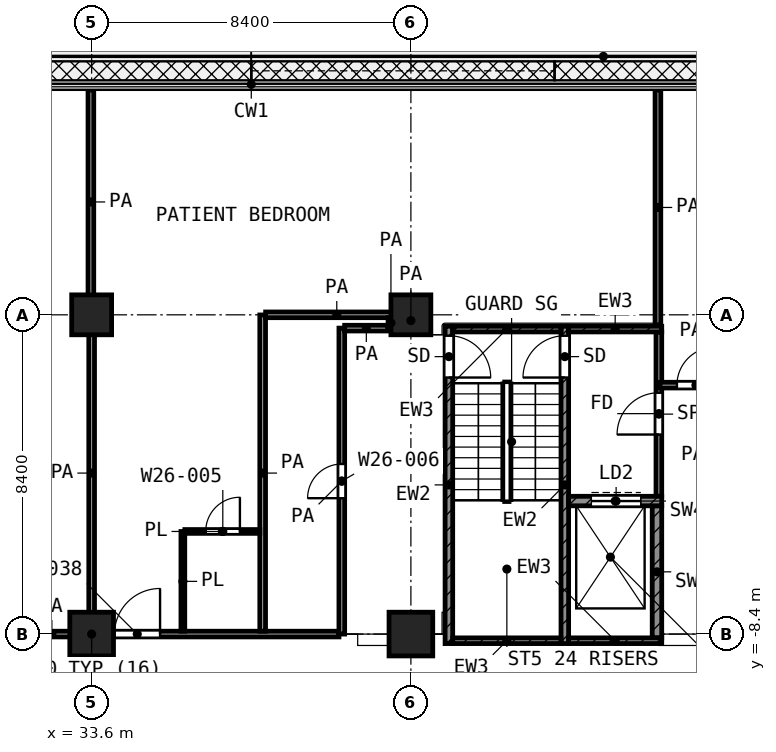
"""IFC4 building model, lengths in metres.
Left out: names, types, materials, properties, quantities, classifications, styles, units other than length and angle.
Written with IfcOpenShell. Run it as: python <this file> out.ifc"""

import sys

from ifc_helpers import new_model, si_unit, direction, frame, frame_2d, origin, origin_2d, place, context, subcontext, project, spatial, rectangle, extrude, element, fill, save


model = new_model("IFC4")
c1 = context("Model", 3, precision=1e-05, world=origin(), true_north=direction((0.0, 1.0)))
c2 = subcontext(c1, "Body", "Model", "MODEL_VIEW")
j1 = project(units=[si_unit("LENGTHUNIT", "METRE"), si_unit("PLANEANGLEUNIT", "RADIAN")], contexts=[c1])
p1 = place(None, origin())
s1 = spatial("IfcSite", under=j1, at=p1, CompositionType="ELEMENT")
p2 = place(p1, origin())
s2 = spatial("IfcBuilding", under=s1, at=p2, CompositionType="ELEMENT")
p3 = place(p2, frame((0.0, 0.0, 136.6)))
s3 = spatial("IfcBuildingStorey", under=s2, at=p3, CompositionType="ELEMENT", Elevation=136.6)
for number, where, z_axis, x_axis in (
    (1, (33.6, 0.0, 0.0), (0.0, 0.0, 1.0), (1.0, 0.0, 0.0)),
    (2, (42.0, 0.0, 0.0), (0.0, 0.0, 1.0), (1.0, 0.0, 0.0)),
):
    element("IfcColumn", number, at=place(p3, frame(where, z_axis=z_axis, x_axis=x_axis)), inside=s3, PredefinedType="COLUMN", context=c2, shape_type="SweptSolid", body=[
        extrude(rectangle(XDim=1.05, YDim=1.05, at=origin_2d()), origin(), (0.0, 0.0, 1.0), 4.2),
    ])
for number, where, z_axis, x_axis in (
    (3, (33.6, -8.4, 0.0), (0.0, 0.0, 1.0), (1.0, 0.0, 0.0)),
    (4, (42.0, -8.4, 0.0), (0.0, 0.0, 1.0), (1.0, 0.0, 0.0)),
):
    element("IfcColumn", number, at=place(p3, frame(where, z_axis=z_axis, x_axis=x_axis)), inside=s3, PredefinedType="COLUMN", context=c2, shape_type="SweptSolid", body=[
        extrude(rectangle(XDim=1.15, YDim=1.15, at=origin_2d()), origin(), (0.0, 0.0, 1.0), 4.2),
    ])
p4 = place(p3, frame((43.0, -8.65, 0.0), z_axis=(0.0, 0.0, 1.0), x_axis=(0.0, 1.0, 0.0)))
e5 = element("IfcWall", 5, at=p4, inside=s3, PredefinedType="SHEAR", context=c2, shape_type="SweptSolid", body=[
    extrude(rectangle(XDim=8.35, YDim=0.2, at=frame_2d((4.175, 0.0))), origin(), (0.0, 0.0, 1.0), 3.6),
])
p5 = place(p4, frame((7.0, 0.0, 0.0)))
e6 = element("IfcOpeningElement", 6, at=p5, cuts=e5, PredefinedType="OPENING", context=c2, shape_type="SweptSolid", body=[
    extrude(rectangle(XDim=1.1, YDim=2.1, at=frame_2d((0.55, 1.05))), frame((0.0, 0.11, 0.0), z_axis=(0.0, -1.0, 0.0), x_axis=(1.0, 0.0, 0.0)), (0.0, 0.0, 1.0), 0.22),
])
p6 = place(p3, frame((46.05, -8.65, 0.0), z_axis=(0.0, 0.0, 1.0), x_axis=(0.0, 1.0, 0.0)))
e7 = element("IfcWall", 7, at=p6, inside=s3, PredefinedType="SHEAR", context=c2, shape_type="SweptSolid", body=[
    extrude(rectangle(XDim=8.35, YDim=0.2, at=frame_2d((4.175, 0.0))), origin(), (0.0, 0.0, 1.0), 3.6),
])
p7 = place(p6, frame((7.0, 0.0, 0.0)))
e8 = element("IfcOpeningElement", 8, at=p7, cuts=e7, PredefinedType="OPENING", context=c2, shape_type="SweptSolid", body=[
    extrude(rectangle(XDim=1.1, YDim=2.1, at=frame_2d((0.55, 1.05))), frame((0.0, 0.11, 0.0), z_axis=(0.0, -1.0, 0.0), x_axis=(1.0, 0.0, 0.0)), (0.0, 0.0, 1.0), 0.22),
])
p8 = place(p3, frame((43.1, -0.375, 0.0), z_axis=(0.0, 0.0, 1.0), x_axis=(1.0, 0.0, 0.0)))
e9 = element("IfcWall", 9, at=p8, inside=s3, PredefinedType="SHEAR", context=c2, shape_type="SweptSolid", body=[
    extrude(rectangle(XDim=2.85, YDim=0.15, at=frame_2d((1.425, 0.0))), origin(), (0.0, 0.0, 1.0), 3.6),
])
p9 = place(p3, frame((46.15, -0.375, 0.0), z_axis=(0.0, 0.0, 1.0), x_axis=(1.0, 0.0, 0.0)))
e10 = element("IfcWall", 10, at=p9, inside=s3, PredefinedType="SHEAR", context=c2, shape_type="SweptSolid", body=[
    extrude(rectangle(XDim=2.45, YDim=0.15, at=frame_2d((1.225, 0.0))), origin(), (0.0, 0.0, 1.0), 3.6),
])
p10 = place(p3, frame((43.1, -8.575, 0.0), z_axis=(0.0, 0.0, 1.0), x_axis=(1.0, 0.0, 0.0)))
e11 = element("IfcWall", 11, at=p10, inside=s3, PredefinedType="SHEAR", context=c2, shape_type="SweptSolid", body=[
    extrude(rectangle(XDim=2.85, YDim=0.15, at=frame_2d((1.425, 0.0))), origin(), (0.0, 0.0, 1.0), 3.6),
])
p11 = place(p3, frame((46.15, -8.575, 0.0), z_axis=(0.0, 0.0, 1.0), x_axis=(1.0, 0.0, 0.0)))
e12 = element("IfcWall", 12, at=p11, inside=s3, PredefinedType="SHEAR", context=c2, shape_type="SweptSolid", body=[
    extrude(rectangle(XDim=2.45, YDim=0.15, at=frame_2d((1.225, 0.0))), origin(), (0.0, 0.0, 1.0), 3.6),
])
p12 = place(p3, frame((46.15, -4.9, 0.0), z_axis=(0.0, 0.0, 1.0), x_axis=(1.0, 0.0, 0.0)))
e13 = element("IfcWall", 13, at=p12, inside=s3, PredefinedType="SHEAR", context=c2, shape_type="SweptSolid", body=[
    extrude(rectangle(XDim=2.45, YDim=0.25, at=frame_2d((1.225, 0.0))), origin(), (0.0, 0.0, 1.0), 3.6),
])
p13 = place(p12, frame((0.6, 0.0, 0.0)))
e14 = element("IfcOpeningElement", 14, at=p13, cuts=e13, PredefinedType="OPENING", context=c2, shape_type="SweptSolid", body=[
    extrude(rectangle(XDim=1.3, YDim=2.1, at=frame_2d((0.65, 1.05))), frame((0.0, 0.135, 0.0), z_axis=(0.0, -1.0, 0.0), x_axis=(1.0, 0.0, 0.0)), (0.0, 0.0, 1.0), 0.27),
])
p14 = place(p3, frame((48.475, -8.5, 0.0), z_axis=(0.0, 0.0, 1.0), x_axis=(0.0, 1.0, 0.0)))
e15 = element("IfcWall", 15, at=p14, inside=s3, PredefinedType="SHEAR", context=c2, shape_type="SweptSolid", body=[
    extrude(rectangle(XDim=3.475, YDim=0.25, at=frame_2d((1.738, 0.0))), origin(), (0.0, 0.0, 1.0), 3.6),
])
p15 = place(p3, frame((48.525, -4.775, 0.0), z_axis=(0.0, 0.0, 1.0), x_axis=(0.0, 1.0, 0.0)))
e16 = element("IfcWall", 16, at=p15, inside=s3, PredefinedType="PARTITIONING", context=c2, shape_type="SweptSolid", body=[
    extrude(rectangle(XDim=4.325, YDim=0.15, at=frame_2d((2.163, 0.0))), origin(), (0.0, 0.0, 1.0), 3.6),
])
p16 = place(p15, frame((1.625, 0.0, 0.0)))
e17 = element("IfcOpeningElement", 17, at=p16, cuts=e16, PredefinedType="OPENING", context=c2, shape_type="SweptSolid", body=[
    extrude(rectangle(XDim=1.1, YDim=2.1, at=frame_2d((0.55, 1.05))), frame((0.0, 0.085, 0.0), z_axis=(0.0, -1.0, 0.0), x_axis=(1.0, 0.0, 0.0)), (0.0, 0.0, 1.0), 0.17),
])
p17 = place(p3, frame((36.052, -5.7, 0.0), z_axis=(0.0, 0.0, 1.0), x_axis=(1.0, 0.0, 0.0)))
e18 = element("IfcWall", 18, at=p17, inside=s3, PredefinedType="PARTITIONING", context=c2, shape_type="SweptSolid", body=[
    extrude(rectangle(XDim=1.973, YDim=0.1, at=frame_2d((0.986, 0.0))), origin(), (0.0, 0.0, 1.0), 3.6),
])
p18 = place(p17, frame((0.549, 0.0, 0.0)))
e19 = element("IfcOpeningElement", 19, at=p18, cuts=e18, PredefinedType="OPENING", context=c2, shape_type="SweptSolid", body=[
    extrude(rectangle(XDim=0.9, YDim=2.1, at=frame_2d((0.45, 1.05))), frame((0.0, 0.06, 0.0), z_axis=(0.0, -1.0, 0.0), x_axis=(1.0, 0.0, 0.0)), (0.0, 0.0, 1.0), 0.12),
])
p19 = place(p3, frame((36.0, -8.325, 0.0), z_axis=(0.0, 0.0, 1.0), x_axis=(0.0, 1.0, 0.0)))
e20 = element("IfcWall", 20, at=p19, inside=s3, PredefinedType="PARTITIONING", context=c2, shape_type="SweptSolid", body=[
    extrude(rectangle(XDim=2.624, YDim=0.1, at=frame_2d((1.312, 0.0))), origin(), (0.0, 0.0, 1.0), 3.6),
])
p20 = place(p3, frame((25.0, -8.4, 0.0), z_axis=(0.0, 0.0, 1.0), x_axis=(1.0, 0.0, 0.0)))
e21 = element("IfcWall", 21, at=p20, inside=s3, PredefinedType="PARTITIONING", context=c2, shape_type="SweptSolid", body=[
    extrude(rectangle(XDim=15.107, YDim=0.15, at=frame_2d((7.553, 0.0))), origin(), (0.0, 0.0, 1.0), 3.6),
])
p21 = place(p20, frame((3.65, 0.0, 0.0)))
e22 = element("IfcOpeningElement", 22, at=p21, cuts=e21, PredefinedType="OPENING", context=c2, shape_type="SweptSolid", body=[
    extrude(rectangle(XDim=1.5, YDim=2.1, at=frame_2d((0.75, 1.05))), frame((0.0, 0.085, 0.0), z_axis=(0.0, -1.0, 0.0), x_axis=(1.0, 0.0, 0.0)), (0.0, 0.0, 1.0), 0.17),
])
p22 = place(p20, frame((9.2, 0.0, 0.0)))
e23 = element("IfcOpeningElement", 23, at=p22, cuts=e21, PredefinedType="OPENING", context=c2, shape_type="SweptSolid", body=[
    extrude(rectangle(XDim=1.2, YDim=2.1, at=frame_2d((0.6, 1.05))), frame((0.0, 0.085, 0.0), z_axis=(0.0, -1.0, 0.0), x_axis=(1.0, 0.0, 0.0)), (0.0, 0.0, 1.0), 0.17),
])
p23 = place(p3, frame((48.55, -1.85, 0.0), z_axis=(0.0, 0.0, 1.0), x_axis=(1.0, 0.0, 0.0)))
e24 = element("IfcWall", 24, at=p23, inside=s3, PredefinedType="PARTITIONING", context=c2, shape_type="SweptSolid", body=[
    extrude(rectangle(XDim=2.298, YDim=0.15, at=frame_2d((1.149, 0.0))), origin(), (0.0, 0.0, 1.0), 3.6),
])
p24 = place(p23, frame((0.45, 0.0, 0.0)))
e25 = element("IfcOpeningElement", 25, at=p24, cuts=e24, PredefinedType="OPENING", context=c2, shape_type="SweptSolid", body=[
    extrude(rectangle(XDim=1.0, YDim=2.1, at=frame_2d((0.5, 1.05))), frame((0.0, 0.085, 0.0), z_axis=(0.0, -1.0, 0.0), x_axis=(1.0, 0.0, 0.0)), (0.0, 0.0, 1.0), 0.17),
])
p25 = place(p3, frame((40.257, -0.35, 0.0), z_axis=(0.0, 0.0, 1.0), x_axis=(1.0, 0.0, 0.0)))
e26 = element("IfcWall", 26, at=p25, inside=s3, PredefinedType="PARTITIONING", context=c2, shape_type="SweptSolid", body=[
    extrude(rectangle(XDim=1.141, YDim=0.15, at=frame_2d((0.57, 0.0))), origin(), (0.0, 0.0, 1.0), 3.6),
])
p26 = place(p3, frame((38.178, 0.0, 0.0), z_axis=(0.0, 0.0, 1.0), x_axis=(1.0, 0.0, 0.0)))
e27 = element("IfcWall", 27, at=p26, inside=s3, PredefinedType="PARTITIONING", context=c2, shape_type="SweptSolid", body=[
    extrude(rectangle(XDim=3.744, YDim=0.15, at=frame_2d((1.872, 0.0))), origin(), (0.0, 0.0, 1.0), 3.6),
])
p27 = place(p3, frame((33.58, 0.02, 0.0), z_axis=(0.0, 0.0, 1.0), x_axis=(0.0, 1.0, 0.0)))
e28 = element("IfcWall", 28, at=p27, inside=s3, PredefinedType="PARTITIONING", context=c2, shape_type="SweptSolid", body=[
    extrude(rectangle(XDim=5.9, YDim=0.15, at=frame_2d((2.95, 0.0))), origin(), (0.0, 0.0, 1.0), 3.6),
])
for number, where, z_axis, x_axis in (
    (29, (33.6, -8.325, 0.0), (0.0, 0.0, 1.0), (0.0, 1.0, 0.0)),
    (30, (38.1, -8.325, 0.0), (0.0, 0.0, 1.0), (0.0, 1.0, 0.0)),
):
    element("IfcWall", number, at=place(p3, frame(where, z_axis=z_axis, x_axis=x_axis)), inside=s3, PredefinedType="PARTITIONING", context=c2, shape_type="SweptSolid", body=[
        extrude(rectangle(XDim=8.322, YDim=0.15, at=frame_2d((4.161, 0.0))), origin(), (0.0, 0.0, 1.0), 3.6),
    ])
p28 = place(p3, frame((40.182, -8.4, 0.0), z_axis=(0.0, 0.0, 1.0), x_axis=(0.0, 1.0, 0.0)))
e31 = element("IfcWall", 31, at=p28, inside=s3, PredefinedType="PARTITIONING", context=c2, shape_type="SweptSolid", body=[
    extrude(rectangle(XDim=8.05, YDim=0.15, at=frame_2d((4.025, 0.0))), origin(), (0.0, 0.0, 1.0), 3.6),
])
p29 = place(p28, frame((3.575, 0.0, 0.0)))
e32 = element("IfcOpeningElement", 32, at=p29, cuts=e31, PredefinedType="OPENING", context=c2, shape_type="SweptSolid", body=[
    extrude(rectangle(XDim=0.9, YDim=2.1, at=frame_2d((0.45, 1.05))), frame((0.0, 0.085, 0.0), z_axis=(0.0, -1.0, 0.0), x_axis=(1.0, 0.0, 0.0)), (0.0, 0.0, 1.0), 0.17),
])
p30 = place(p3, frame((41.475, -0.348, 0.0), z_axis=(0.0, 0.0, 1.0), x_axis=(0.0, 1.0, 0.0)))
e33 = element("IfcWall", 33, at=p30, inside=s3, PredefinedType="PARTITIONING", context=c2, shape_type="SweptSolid", body=[
    extrude(rectangle(XDim=0.273, YDim=0.15, at=frame_2d((0.136, 0.0))), origin(), (0.0, 0.0, 1.0), 3.6),
])
p31 = place(p3, frame((42.0, -0.3, 0.0), z_axis=(0.0, 0.0, 1.0), x_axis=(0.0, 1.0, 0.0)))
e34 = element("IfcWall", 34, at=p31, inside=s3, PredefinedType="PARTITIONING", context=c2, shape_type="SweptSolid", body=[
    extrude(rectangle(XDim=0.297, YDim=0.15, at=frame_2d((0.148, 0.0))), origin(), (0.0, 0.0, 1.0), 3.6),
])
p32 = place(p3, frame((48.5, -0.27, 0.0), z_axis=(0.0, 0.0, 1.0), x_axis=(0.0, 1.0, 0.0)))
e35 = element("IfcWall", 35, at=p32, inside=s3, PredefinedType="PARTITIONING", context=c2, shape_type="SweptSolid", body=[
    extrude(rectangle(XDim=6.19, YDim=0.15, at=frame_2d((3.095, 0.0))), origin(), (0.0, 0.0, 1.0), 3.6),
])
p33 = place(p5, frame((1.1, 0.0, 0.0), z_axis=(0.0, 0.0, 1.0), x_axis=(-1.0, 0.0, 0.0)))
e36 = element("IfcDoor", 36, at=p33, inside=s3, OperationType="SINGLE_SWING_LEFT", PredefinedType="DOOR", context=c2, shape_type="SweptSolid", body=[
    extrude(rectangle(XDim=1.1, YDim=2.1, at=frame_2d((0.55, 1.05))), frame((0.0, 0.025, 0.0), z_axis=(0.0, -1.0, 0.0), x_axis=(1.0, 0.0, 0.0)), (0.0, 0.0, 1.0), 0.05),
])
fill(e6, e36)
p34 = place(p7, origin())
e37 = element("IfcDoor", 37, at=p34, inside=s3, OperationType="SINGLE_SWING_LEFT", PredefinedType="DOOR", context=c2, shape_type="SweptSolid", body=[
    extrude(rectangle(XDim=1.1, YDim=2.1, at=frame_2d((0.55, 1.05))), frame((0.0, 0.025, 0.0), z_axis=(0.0, -1.0, 0.0), x_axis=(1.0, 0.0, 0.0)), (0.0, 0.0, 1.0), 0.05),
])
fill(e8, e37)
p35 = place(p13, origin())
e38 = element("IfcDoor", 38, at=p35, inside=s3, OperationType="DOUBLE_DOOR_SLIDING", PredefinedType="DOOR", context=c2, shape_type="SweptSolid", body=[
    extrude(rectangle(XDim=1.3, YDim=2.1, at=frame_2d((0.65, 1.05))), frame((0.0, 0.025, 0.0), z_axis=(0.0, -1.0, 0.0), x_axis=(1.0, 0.0, 0.0)), (0.0, 0.0, 1.0), 0.05),
])
fill(e14, e38)
p36 = place(p16, origin())
e39 = element("IfcDoor", 39, at=p36, inside=s3, OperationType="SINGLE_SWING_LEFT", PredefinedType="DOOR", context=c2, shape_type="SweptSolid", body=[
    extrude(rectangle(XDim=1.1, YDim=2.1, at=frame_2d((0.55, 1.05))), frame((0.0, 0.025, 0.0), z_axis=(0.0, -1.0, 0.0), x_axis=(1.0, 0.0, 0.0)), (0.0, 0.0, 1.0), 0.05),
])
fill(e17, e39)
p37 = place(p22, origin())
e40 = element("IfcDoor", 40, at=p37, inside=s3, OperationType="SINGLE_SWING_RIGHT", PredefinedType="DOOR", context=c2, shape_type="SweptSolid", body=[
    extrude(rectangle(XDim=1.2, YDim=2.1, at=frame_2d((0.6, 1.05))), frame((0.0, 0.025, 0.0), z_axis=(0.0, -1.0, 0.0), x_axis=(1.0, 0.0, 0.0)), (0.0, 0.0, 1.0), 0.05),
])
fill(e23, e40)
p38 = place(p18, origin())
e41 = element("IfcDoor", 41, at=p38, inside=s3, OperationType="SINGLE_SWING_RIGHT", PredefinedType="DOOR", context=c2, shape_type="SweptSolid", body=[
    extrude(rectangle(XDim=0.9, YDim=2.1, at=frame_2d((0.45, 1.05))), frame((0.0, 0.025, 0.0), z_axis=(0.0, -1.0, 0.0), x_axis=(1.0, 0.0, 0.0)), (0.0, 0.0, 1.0), 0.05),
])
fill(e19, e41)
p39 = place(p29, origin())
e42 = element("IfcDoor", 42, at=p39, inside=s3, OperationType="SINGLE_SWING_LEFT", PredefinedType="DOOR", context=c2, shape_type="SweptSolid", body=[
    extrude(rectangle(XDim=0.9, YDim=2.1, at=frame_2d((0.45, 1.05))), frame((0.0, 0.025, 0.0), z_axis=(0.0, -1.0, 0.0), x_axis=(1.0, 0.0, 0.0)), (0.0, 0.0, 1.0), 0.05),
])
fill(e32, e42)
p40 = place(p24, origin())
e43 = element("IfcDoor", 43, at=p40, inside=s3, OperationType="SINGLE_SWING_RIGHT", PredefinedType="DOOR", context=c2, shape_type="SweptSolid", body=[
    extrude(rectangle(XDim=1.0, YDim=2.1, at=frame_2d((0.5, 1.05))), frame((0.0, 0.025, 0.0), z_axis=(0.0, -1.0, 0.0), x_axis=(1.0, 0.0, 0.0)), (0.0, 0.0, 1.0), 0.05),
])
fill(e25, e43)
save(model, sys.argv[1])
